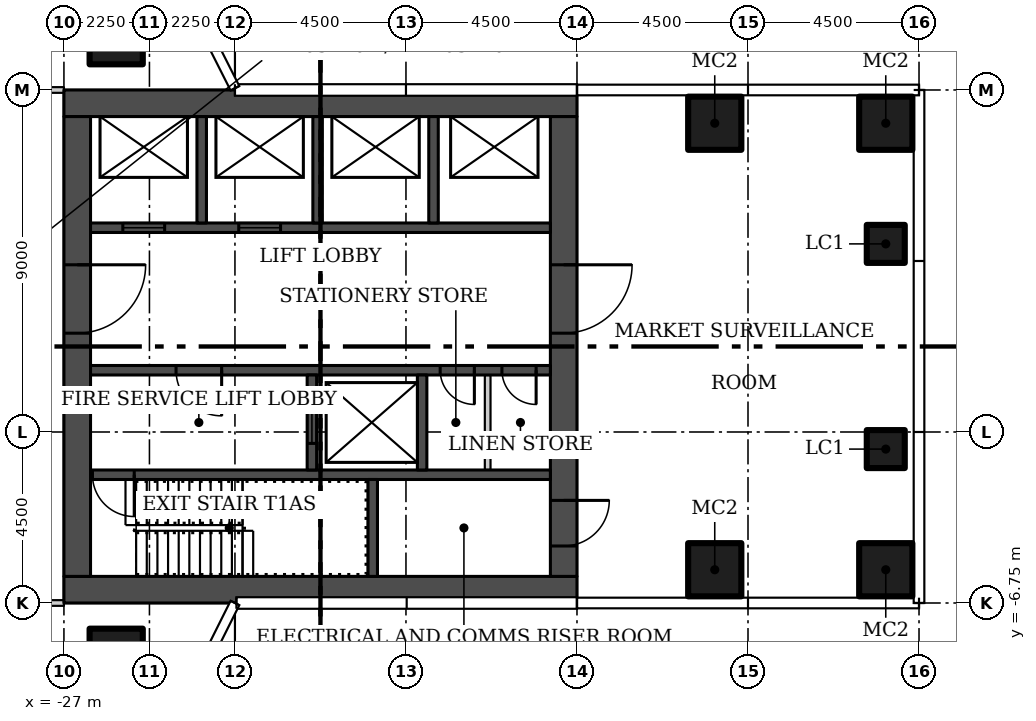
"""IFC4 building model, lengths in metres.
Left out: names, types, materials, properties, quantities, classifications, styles, units other than length and angle.
Written with IfcOpenShell. Run it as: python <this file> out.ifc"""

import sys

from ifc_helpers import new_model, si_unit, direction, frame, frame_2d, origin, origin_2d, place, context, subcontext, project, spatial, rectangle, hollow_rectangle, extrude, element, fill, save


model = new_model("IFC4")
c1 = context("Model", 3, precision=1e-05, world=origin(), true_north=direction((0.0, 1.0)))
c2 = subcontext(c1, "Body", "Model", "MODEL_VIEW")
j1 = project(units=[si_unit("LENGTHUNIT", "METRE"), si_unit("PLANEANGLEUNIT", "RADIAN")], contexts=[c1])
p1 = place(None, origin())
s1 = spatial("IfcSite", under=j1, at=p1, CompositionType="ELEMENT")
p2 = place(p1, origin())
s2 = spatial("IfcBuilding", under=s1, at=p2, CompositionType="ELEMENT")
p3 = place(p2, frame((0.0, 0.0, 42.0)))
s3 = spatial("IfcBuildingStorey", under=s2, at=p3, CompositionType="ELEMENT", Elevation=42.0)
for number, where in (
    (1, (-25.625, 8.125, 0.0)),
    (2, (-25.625, -8.125, 0.0)),
    (3, (-9.875, -5.875, 0.0)),
    (4, (-5.375, -5.875, 0.0)),
    (5, (-9.875, 5.875, 0.0)),
    (6, (-5.375, 5.875, 0.0)),
):
    element("IfcColumn", number, at=place(p3, frame(where)), inside=s3, PredefinedType="COLUMN", context=c2, shape_type="SweptSolid", body=[
        extrude(hollow_rectangle(XDim=1.4, YDim=1.4, WallThickness=0.05, at=origin_2d()), origin(), (0.0, 0.0, 1.0), 3.55),
    ])
for number, where in (
    (7, (-5.375, -2.7, 0.0)),
    (8, (-5.375, 2.7, 0.0)),
):
    element("IfcColumn", number, at=place(p3, frame(where)), inside=s3, PredefinedType="COLUMN", context=c2, shape_type="SweptSolid", body=[
        extrude(hollow_rectangle(XDim=1.0, YDim=1.0, WallThickness=0.04, at=origin_2d()), origin(), (0.0, 0.0, 1.0), 3.55),
    ])
p4 = place(p3, frame((-40.5, 6.75, 0.0)))
e9 = element("IfcWall", 9, at=p4, inside=s3, PredefinedType="PARTITIONING", context=c2, shape_type="SweptSolid", body=[
    extrude(rectangle(XDim=13.5, YDim=0.15, at=frame_2d((6.75, 0.0))), origin(), (0.0, 0.0, 1.0), 3.55),
])
p5 = place(p4, frame((3.75, 0.0, 0.0)))
e10 = element("IfcOpeningElement", 10, at=p5, cuts=e9, PredefinedType="OPENING", context=c2, shape_type="SweptSolid", body=[
    extrude(rectangle(XDim=1.5, YDim=2.1, at=frame_2d((0.75, 1.05))), frame((0.0, 0.085, 0.0), z_axis=(0.0, -1.0, 0.0), x_axis=(1.0, 0.0, 0.0)), (0.0, 0.0, 1.0), 0.17),
])
p6 = place(p4, frame((10.5, 0.0, 0.0)))
e11 = element("IfcOpeningElement", 11, at=p6, cuts=e9, PredefinedType="OPENING", context=c2, shape_type="SweptSolid", body=[
    extrude(rectangle(XDim=1.5, YDim=2.1, at=frame_2d((0.75, 1.05))), frame((0.0, 0.085, 0.0), z_axis=(0.0, -1.0, 0.0), x_axis=(1.0, 0.0, 0.0)), (0.0, 0.0, 1.0), 0.17),
])
p7 = place(p3, frame((-27.0, -6.75, 0.0), z_axis=(0.0, 0.0, 1.0), x_axis=(-1.0, 0.0, 0.0)))
e12 = element("IfcWall", 12, at=p7, inside=s3, PredefinedType="PARTITIONING", context=c2, shape_type="SweptSolid", body=[
    extrude(rectangle(XDim=13.5, YDim=0.15, at=frame_2d((6.75, 0.0))), origin(), (0.0, 0.0, 1.0), 3.55),
])
p8 = place(p7, frame((1.5, 0.0, 0.0)))
e13 = element("IfcOpeningElement", 13, at=p8, cuts=e12, PredefinedType="OPENING", context=c2, shape_type="SweptSolid", body=[
    extrude(rectangle(XDim=1.5, YDim=2.1, at=frame_2d((0.75, 1.05))), frame((0.0, 0.085, 0.0), z_axis=(0.0, -1.0, 0.0), x_axis=(1.0, 0.0, 0.0)), (0.0, 0.0, 1.0), 0.17),
])
p9 = place(p7, frame((6.0, 0.0, 0.0)))
e14 = element("IfcOpeningElement", 14, at=p9, cuts=e12, PredefinedType="OPENING", context=c2, shape_type="SweptSolid", body=[
    extrude(rectangle(XDim=1.5, YDim=2.1, at=frame_2d((0.75, 1.05))), frame((0.0, 0.085, 0.0), z_axis=(0.0, -1.0, 0.0), x_axis=(1.0, 0.0, 0.0)), (0.0, 0.0, 1.0), 0.17),
])
p10 = place(p7, frame((10.5, 0.0, 0.0)))
e15 = element("IfcOpeningElement", 15, at=p10, cuts=e12, PredefinedType="OPENING", context=c2, shape_type="SweptSolid", body=[
    extrude(rectangle(XDim=1.5, YDim=2.1, at=frame_2d((0.75, 1.05))), frame((0.0, 0.085, 0.0), z_axis=(0.0, -1.0, 0.0), x_axis=(1.0, 0.0, 0.0)), (0.0, 0.0, 1.0), 0.17),
])
for number, where in (
    (16, (-27.0, -6.4, 0.0)),
    (17, (-27.0, 6.4, 0.0)),
):
    element("IfcWall", number, at=place(p3, frame(where)), inside=s3, PredefinedType="SHEAR", context=c2, shape_type="SweptSolid", body=[
        extrude(rectangle(XDim=13.5, YDim=0.7, at=frame_2d((6.75, 0.0))), origin(), (0.0, 0.0, 1.0), 3.55),
    ])
p11 = place(p3, frame((-26.65, 6.05, 0.0), z_axis=(0.0, 0.0, 1.0), x_axis=(0.0, -1.0, 0.0)))
e18 = element("IfcWall", 18, at=p11, inside=s3, PredefinedType="SHEAR", context=c2, shape_type="SweptSolid", body=[
    extrude(rectangle(XDim=12.1, YDim=0.7, at=frame_2d((6.05, 0.0))), origin(), (0.0, 0.0, 1.0), 3.55),
])
p12 = place(p11, frame((3.9, 0.0, 0.0)))
e19 = element("IfcOpeningElement", 19, at=p12, cuts=e18, PredefinedType="OPENING", context=c2, shape_type="SweptSolid", body=[
    extrude(rectangle(XDim=1.8, YDim=2.4, at=frame_2d((0.9, 1.2))), frame((0.0, 0.36, 0.0), z_axis=(0.0, -1.0, 0.0), x_axis=(1.0, 0.0, 0.0)), (0.0, 0.0, 1.0), 0.72),
])
p13 = place(p3, frame((-13.85, 6.05, 0.0), z_axis=(0.0, 0.0, 1.0), x_axis=(0.0, -1.0, 0.0)))
e20 = element("IfcWall", 20, at=p13, inside=s3, PredefinedType="SHEAR", context=c2, shape_type="SweptSolid", body=[
    extrude(rectangle(XDim=12.1, YDim=0.7, at=frame_2d((6.05, 0.0))), origin(), (0.0, 0.0, 1.0), 3.55),
])
p14 = place(p13, frame((10.1, 0.0, 0.0)))
e21 = element("IfcOpeningElement", 21, at=p14, cuts=e20, PredefinedType="OPENING", context=c2, shape_type="SweptSolid", body=[
    extrude(rectangle(XDim=1.2, YDim=2.1, at=frame_2d((0.6, 1.05))), frame((0.0, 0.36, 0.0), z_axis=(0.0, -1.0, 0.0), x_axis=(1.0, 0.0, 0.0)), (0.0, 0.0, 1.0), 0.72),
])
p15 = place(p13, frame((3.9, 0.0, 0.0)))
e22 = element("IfcOpeningElement", 22, at=p15, cuts=e20, PredefinedType="OPENING", context=c2, shape_type="SweptSolid", body=[
    extrude(rectangle(XDim=1.8, YDim=2.4, at=frame_2d((0.9, 1.2))), frame((0.0, 0.36, 0.0), z_axis=(0.0, -1.0, 0.0), x_axis=(1.0, 0.0, 0.0)), (0.0, 0.0, 1.0), 0.72),
])
p16 = place(p3, frame((-14.2, -3.375, 0.0), z_axis=(0.0, 0.0, 1.0), x_axis=(-1.0, 0.0, 0.0)))
e23 = element("IfcWall", 23, at=p16, inside=s3, PredefinedType="SHEAR", context=c2, shape_type="SweptSolid", body=[
    extrude(rectangle(XDim=12.1, YDim=0.25, at=frame_2d((6.05, 0.0))), origin(), (0.0, 0.0, 1.0), 3.55),
])
p17 = place(p16, frame((10.95, 0.0, 0.0)))
e24 = element("IfcOpeningElement", 24, at=p17, cuts=e23, PredefinedType="OPENING", context=c2, shape_type="SweptSolid", body=[
    extrude(rectangle(XDim=1.1, YDim=2.1, at=frame_2d((0.55, 1.05))), frame((0.0, 0.135, 0.0), z_axis=(0.0, -1.0, 0.0), x_axis=(1.0, 0.0, 0.0)), (0.0, 0.0, 1.0), 0.27),
])
p18 = place(p3, frame((-18.875, -6.05, 0.0), z_axis=(0.0, 0.0, 1.0), x_axis=(0.0, 1.0, 0.0)))
e25 = element("IfcWall", 25, at=p18, inside=s3, PredefinedType="SHEAR", context=c2, shape_type="SweptSolid", body=[
    extrude(rectangle(XDim=2.55, YDim=0.25, at=frame_2d((1.275, 0.0))), origin(), (0.0, 0.0, 1.0), 3.55),
])
p19 = place(p3, frame((-14.2, -0.625, 0.0), z_axis=(0.0, 0.0, 1.0), x_axis=(-1.0, 0.0, 0.0)))
e26 = element("IfcWall", 26, at=p19, inside=s3, PredefinedType="SHEAR", context=c2, shape_type="SweptSolid", body=[
    extrude(rectangle(XDim=12.1, YDim=0.25, at=frame_2d((6.05, 0.0))), origin(), (0.0, 0.0, 1.0), 3.55),
])
p20 = place(p19, frame((8.65, 0.0, 0.0)))
e27 = element("IfcOpeningElement", 27, at=p20, cuts=e26, PredefinedType="OPENING", context=c2, shape_type="SweptSolid", body=[
    extrude(rectangle(XDim=1.2, YDim=2.1, at=frame_2d((0.6, 1.05))), frame((0.0, 0.135, 0.0), z_axis=(0.0, -1.0, 0.0), x_axis=(1.0, 0.0, 0.0)), (0.0, 0.0, 1.0), 0.27),
])
p21 = place(p19, frame((2.0, 0.0, 0.0)))
e28 = element("IfcOpeningElement", 28, at=p21, cuts=e26, PredefinedType="OPENING", context=c2, shape_type="SweptSolid", body=[
    extrude(rectangle(XDim=0.9, YDim=2.1, at=frame_2d((0.45, 1.05))), frame((0.0, 0.135, 0.0), z_axis=(0.0, -1.0, 0.0), x_axis=(1.0, 0.0, 0.0)), (0.0, 0.0, 1.0), 0.27),
])
p22 = place(p19, frame((0.375, 0.0, 0.0)))
e29 = element("IfcOpeningElement", 29, at=p22, cuts=e26, PredefinedType="OPENING", context=c2, shape_type="SweptSolid", body=[
    extrude(rectangle(XDim=0.9, YDim=2.1, at=frame_2d((0.45, 1.05))), frame((0.0, 0.135, 0.0), z_axis=(0.0, -1.0, 0.0), x_axis=(1.0, 0.0, 0.0)), (0.0, 0.0, 1.0), 0.27),
])
p23 = place(p3, frame((-20.475, -3.25, 0.0), z_axis=(0.0, 0.0, 1.0), x_axis=(0.0, 1.0, 0.0)))
e30 = element("IfcWall", 30, at=p23, inside=s3, PredefinedType="SHEAR", context=c2, shape_type="SweptSolid", body=[
    extrude(rectangle(XDim=2.5, YDim=0.25, at=frame_2d((1.25, 0.0))), origin(), (0.0, 0.0, 1.0), 3.55),
])
p24 = place(p23, frame((0.7, 0.0, 0.0)))
e31 = element("IfcOpeningElement", 31, at=p24, cuts=e30, PredefinedType="OPENING", context=c2, shape_type="SweptSolid", body=[
    extrude(rectangle(XDim=1.1, YDim=2.1, at=frame_2d((0.55, 1.05))), frame((0.0, 0.135, 0.0), z_axis=(0.0, -1.0, 0.0), x_axis=(1.0, 0.0, 0.0)), (0.0, 0.0, 1.0), 0.27),
])
p25 = place(p3, frame((-17.575, -3.25, 0.0), z_axis=(0.0, 0.0, 1.0), x_axis=(0.0, 1.0, 0.0)))
e32 = element("IfcWall", 32, at=p25, inside=s3, PredefinedType="SHEAR", context=c2, shape_type="SweptSolid", body=[
    extrude(rectangle(XDim=2.5, YDim=0.25, at=frame_2d((1.25, 0.0))), origin(), (0.0, 0.0, 1.0), 3.55),
])
p26 = place(p3, frame((-15.85, -3.25, 0.0), z_axis=(0.0, 0.0, 1.0), x_axis=(0.0, 1.0, 0.0)))
e33 = element("IfcWall", 33, at=p26, inside=s3, PredefinedType="PARTITIONING", context=c2, shape_type="SweptSolid", body=[
    extrude(rectangle(XDim=2.5, YDim=0.15, at=frame_2d((1.25, 0.0))), origin(), (0.0, 0.0, 1.0), 3.55),
])
p27 = place(p3, frame((-26.3, 3.125, 0.0)))
e34 = element("IfcWall", 34, at=p27, inside=s3, PredefinedType="SHEAR", context=c2, shape_type="SweptSolid", body=[
    extrude(rectangle(XDim=12.1, YDim=0.25, at=frame_2d((6.05, 0.0))), origin(), (0.0, 0.0, 1.0), 3.55),
])
p28 = place(p27, frame((0.85, 0.0, 0.0)))
e35 = element("IfcOpeningElement", 35, at=p28, cuts=e34, PredefinedType="OPENING", context=c2, shape_type="SweptSolid", body=[
    extrude(rectangle(XDim=1.1, YDim=2.1, at=frame_2d((0.55, 1.05))), frame((0.0, 0.135, 0.0), z_axis=(0.0, -1.0, 0.0), x_axis=(1.0, 0.0, 0.0)), (0.0, 0.0, 1.0), 0.27),
])
p29 = place(p27, frame((3.9, 0.0, 0.0)))
e36 = element("IfcOpeningElement", 36, at=p29, cuts=e34, PredefinedType="OPENING", context=c2, shape_type="SweptSolid", body=[
    extrude(rectangle(XDim=1.1, YDim=2.1, at=frame_2d((0.55, 1.05))), frame((0.0, 0.135, 0.0), z_axis=(0.0, -1.0, 0.0), x_axis=(1.0, 0.0, 0.0)), (0.0, 0.0, 1.0), 0.27),
])
for number, where, z_axis, x_axis in (
    (37, (-23.375, 3.25, 0.0), (0.0, 0.0, 1.0), (0.0, 1.0, 0.0)),
    (38, (-20.325, 3.25, 0.0), (0.0, 0.0, 1.0), (0.0, 1.0, 0.0)),
    (39, (-17.275, 3.25, 0.0), (0.0, 0.0, 1.0), (0.0, 1.0, 0.0)),
):
    element("IfcWall", number, at=place(p3, frame(where, z_axis=z_axis, x_axis=x_axis)), inside=s3, PredefinedType="SHEAR", context=c2, shape_type="SweptSolid", body=[
        extrude(rectangle(XDim=2.8, YDim=0.25, at=frame_2d((1.4, 0.0))), origin(), (0.0, 0.0, 1.0), 3.55),
    ])
p30 = place(p12, origin())
e40 = element("IfcDoor", 40, at=p30, inside=s3, OperationType="DOUBLE_DOOR_SINGLE_SWING", PredefinedType="DOOR", context=c2, shape_type="SweptSolid", body=[
    extrude(rectangle(XDim=1.8, YDim=2.4, at=frame_2d((0.9, 1.2))), frame((0.0, 0.025, 0.0), z_axis=(0.0, -1.0, 0.0), x_axis=(1.0, 0.0, 0.0)), (0.0, 0.0, 1.0), 0.05),
])
fill(e19, e40)
p31 = place(p14, origin())
e41 = element("IfcDoor", 41, at=p31, inside=s3, OperationType="SINGLE_SWING_RIGHT", PredefinedType="DOOR", context=c2, shape_type="SweptSolid", body=[
    extrude(rectangle(XDim=1.2, YDim=2.1, at=frame_2d((0.6, 1.05))), frame((0.0, 0.025, 0.0), z_axis=(0.0, -1.0, 0.0), x_axis=(1.0, 0.0, 0.0)), (0.0, 0.0, 1.0), 0.05),
])
fill(e21, e41)
p32 = place(p15, origin())
e42 = element("IfcDoor", 42, at=p32, inside=s3, OperationType="DOUBLE_DOOR_SINGLE_SWING", PredefinedType="DOOR", context=c2, shape_type="SweptSolid", body=[
    extrude(rectangle(XDim=1.8, YDim=2.4, at=frame_2d((0.9, 1.2))), frame((0.0, 0.025, 0.0), z_axis=(0.0, -1.0, 0.0), x_axis=(1.0, 0.0, 0.0)), (0.0, 0.0, 1.0), 0.05),
])
fill(e22, e42)
p33 = place(p17, origin())
e43 = element("IfcDoor", 43, at=p33, inside=s3, OperationType="SINGLE_SWING_RIGHT", PredefinedType="DOOR", context=c2, shape_type="SweptSolid", body=[
    extrude(rectangle(XDim=1.1, YDim=2.1, at=frame_2d((0.55, 1.05))), frame((0.0, 0.025, 0.0), z_axis=(0.0, -1.0, 0.0), x_axis=(1.0, 0.0, 0.0)), (0.0, 0.0, 1.0), 0.05),
])
fill(e24, e43)
p34 = place(p20, origin())
e44 = element("IfcDoor", 44, at=p34, inside=s3, OperationType="SINGLE_SWING_RIGHT", PredefinedType="DOOR", context=c2, shape_type="SweptSolid", body=[
    extrude(rectangle(XDim=1.2, YDim=2.1, at=frame_2d((0.6, 1.05))), frame((0.0, 0.025, 0.0), z_axis=(0.0, -1.0, 0.0), x_axis=(1.0, 0.0, 0.0)), (0.0, 0.0, 1.0), 0.05),
])
fill(e27, e44)
p35 = place(p21, origin())
e45 = element("IfcDoor", 45, at=p35, inside=s3, OperationType="SINGLE_SWING_LEFT", PredefinedType="DOOR", context=c2, shape_type="SweptSolid", body=[
    extrude(rectangle(XDim=0.9, YDim=2.1, at=frame_2d((0.45, 1.05))), frame((0.0, 0.025, 0.0), z_axis=(0.0, -1.0, 0.0), x_axis=(1.0, 0.0, 0.0)), (0.0, 0.0, 1.0), 0.05),
])
fill(e28, e45)
p36 = place(p22, origin())
e46 = element("IfcDoor", 46, at=p36, inside=s3, OperationType="SINGLE_SWING_LEFT", PredefinedType="DOOR", context=c2, shape_type="SweptSolid", body=[
    extrude(rectangle(XDim=0.9, YDim=2.1, at=frame_2d((0.45, 1.05))), frame((0.0, 0.025, 0.0), z_axis=(0.0, -1.0, 0.0), x_axis=(1.0, 0.0, 0.0)), (0.0, 0.0, 1.0), 0.05),
])
fill(e29, e46)
p37 = place(p24, origin())
e47 = element("IfcDoor", 47, at=p37, inside=s3, OperationType="SLIDING_TO_LEFT", PredefinedType="DOOR", context=c2, shape_type="SweptSolid", body=[
    extrude(rectangle(XDim=1.1, YDim=2.1, at=frame_2d((0.55, 1.05))), frame((0.0, 0.025, 0.0), z_axis=(0.0, -1.0, 0.0), x_axis=(1.0, 0.0, 0.0)), (0.0, 0.0, 1.0), 0.05),
])
fill(e31, e47)
p38 = place(p28, origin())
e48 = element("IfcDoor", 48, at=p38, inside=s3, OperationType="SLIDING_TO_LEFT", PredefinedType="DOOR", context=c2, shape_type="SweptSolid", body=[
    extrude(rectangle(XDim=1.1, YDim=2.1, at=frame_2d((0.55, 1.05))), frame((0.0, 0.025, 0.0), z_axis=(0.0, -1.0, 0.0), x_axis=(1.0, 0.0, 0.0)), (0.0, 0.0, 1.0), 0.05),
])
fill(e35, e48)
p39 = place(p29, origin())
e49 = element("IfcDoor", 49, at=p39, inside=s3, OperationType="SLIDING_TO_LEFT", PredefinedType="DOOR", context=c2, shape_type="SweptSolid", body=[
    extrude(rectangle(XDim=1.1, YDim=2.1, at=frame_2d((0.55, 1.05))), frame((0.0, 0.025, 0.0), z_axis=(0.0, -1.0, 0.0), x_axis=(1.0, 0.0, 0.0)), (0.0, 0.0, 1.0), 0.05),
])
fill(e36, e49)
save(model, sys.argv[1])
